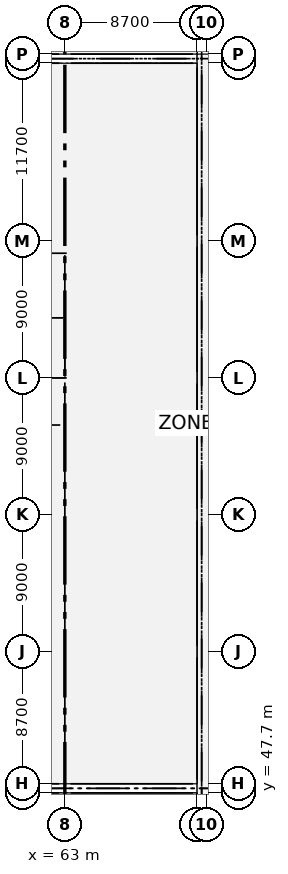
"""IFC4 building model, lengths in metres.
Left out: names, types, materials, properties, quantities, classifications, styles, units other than length and angle.
Written with IfcOpenShell. Run it as: python <this file> out.ifc"""

import sys

from ifc_helpers import new_model, si_unit, direction, frame, frame_2d, origin, origin_2d, place, context, subcontext, project, spatial, rectangle, extrude, element, fill, save


model = new_model("IFC4")
c1 = context("Model", 3, precision=1e-05, world=origin(), true_north=direction((0.0, 1.0)))
c2 = subcontext(c1, "Body", "Model", "MODEL_VIEW")
j1 = project(units=[si_unit("LENGTHUNIT", "METRE"), si_unit("PLANEANGLEUNIT", "RADIAN")], contexts=[c1])
p1 = place(None, origin())
s1 = spatial("IfcSite", under=j1, at=p1, CompositionType="ELEMENT")
p2 = place(p1, origin())
s2 = spatial("IfcBuilding", under=s1, at=p2, CompositionType="ELEMENT")
p3 = place(p2, origin())
s3 = spatial("IfcBuildingStorey", under=s2, at=p3, CompositionType="ELEMENT", Elevation=0.0)
for number, where, z_axis, x_axis in (
    (1, (63.0, 47.7, -0.5), (0.0, 0.0, 1.0), (1.0, 0.0, 0.0)),
    (2, (63.0, 48.3, -0.5), (0.0, 0.0, 1.0), (1.0, 0.0, 0.0)),
):
    element("IfcColumn", number, at=place(p3, frame(where, z_axis=z_axis, x_axis=x_axis)), inside=s3, PredefinedType="COLUMN", context=c2, shape_type="SweptSolid", body=[
        extrude(rectangle(XDim=0.75, YDim=0.55, at=origin_2d()), origin(), (0.0, 0.0, 1.0), 6.8),
    ])
for number, where, z_axis, x_axis in (
    (3, (63.0, 57.0, -0.5), (0.0, 0.0, 1.0), (1.0, 0.0, 0.0)),
    (4, (63.0, 66.0, -0.5), (0.0, 0.0, 1.0), (1.0, 0.0, 0.0)),
    (5, (63.0, 75.0, -0.5), (0.0, 0.0, 1.0), (1.0, 0.0, 0.0)),
    (6, (63.0, 84.0, -0.5), (0.0, 0.0, 1.0), (1.0, 0.0, 0.0)),
):
    element("IfcColumn", number, at=place(p3, frame(where, z_axis=z_axis, x_axis=x_axis)), inside=s3, PredefinedType="COLUMN", context=c2, shape_type="SweptSolid", body=[
        extrude(rectangle(XDim=0.75, YDim=0.75, at=origin_2d()), origin(), (0.0, 0.0, 1.0), 6.8),
    ])
for number, where, z_axis, x_axis in (
    (7, (63.0, 95.7, -0.5), (0.0, 0.0, 1.0), (1.0, 0.0, 0.0)),
    (8, (63.0, 96.3, -0.5), (0.0, 0.0, 1.0), (1.0, 0.0, 0.0)),
):
    element("IfcColumn", number, at=place(p3, frame(where, z_axis=z_axis, x_axis=x_axis)), inside=s3, PredefinedType="COLUMN", context=c2, shape_type="SweptSolid", body=[
        extrude(rectangle(XDim=0.75, YDim=0.55, at=origin_2d()), origin(), (0.0, 0.0, 1.0), 6.8),
    ])
for number, where, z_axis, x_axis in (
    (9, (71.7, 47.7, -0.5), (0.0, 0.0, 1.0), (1.0, 0.0, 0.0)),
    (10, (71.7, 48.3, -0.5), (0.0, 0.0, 1.0), (1.0, 0.0, 0.0)),
):
    element("IfcColumn", number, at=place(p3, frame(where, z_axis=z_axis, x_axis=x_axis)), inside=s3, PredefinedType="COLUMN", context=c2, shape_type="SweptSolid", body=[
        extrude(rectangle(XDim=0.55, YDim=0.55, at=origin_2d()), origin(), (0.0, 0.0, 1.0), 6.8),
    ])
for number, where, z_axis, x_axis in (
    (11, (71.7, 57.0, -0.5), (0.0, 0.0, 1.0), (1.0, 0.0, 0.0)),
    (12, (71.7, 66.0, -0.5), (0.0, 0.0, 1.0), (1.0, 0.0, 0.0)),
    (13, (71.7, 75.0, -0.5), (0.0, 0.0, 1.0), (1.0, 0.0, 0.0)),
    (14, (71.7, 84.0, -0.5), (0.0, 0.0, 1.0), (1.0, 0.0, 0.0)),
):
    element("IfcColumn", number, at=place(p3, frame(where, z_axis=z_axis, x_axis=x_axis)), inside=s3, PredefinedType="COLUMN", context=c2, shape_type="SweptSolid", body=[
        extrude(rectangle(XDim=0.55, YDim=0.75, at=origin_2d()), origin(), (0.0, 0.0, 1.0), 6.8),
    ])
for number, where, z_axis, x_axis in (
    (15, (71.7, 95.7, -0.5), (0.0, 0.0, 1.0), (1.0, 0.0, 0.0)),
    (16, (71.7, 96.3, -0.5), (0.0, 0.0, 1.0), (1.0, 0.0, 0.0)),
    (17, (72.3, 96.3, -0.5), (0.0, 0.0, 1.0), (1.0, 0.0, 0.0)),
):
    element("IfcColumn", number, at=place(p3, frame(where, z_axis=z_axis, x_axis=x_axis)), inside=s3, PredefinedType="COLUMN", context=c2, shape_type="SweptSolid", body=[
        extrude(rectangle(XDim=0.55, YDim=0.55, at=origin_2d()), origin(), (0.0, 0.0, 1.0), 6.8),
    ])
p4 = place(p3, frame((54.375, 47.7, 0.0), z_axis=(0.0, 0.0, 1.0), x_axis=(1.0, 0.0, 0.0)))
e18 = element("IfcWall", 18, at=p4, inside=s3, PredefinedType="SOLIDWALL", context=c2, shape_type="SweptSolid", body=[
    extrude(rectangle(XDim=8.25, YDim=0.38, at=frame_2d((4.125, 0.0))), origin(), (0.0, 0.0, 1.0), 5.08),
])
p5 = place(p3, frame((63.375, 47.7, 0.0), z_axis=(0.0, 0.0, 1.0), x_axis=(1.0, 0.0, 0.0)))
e19 = element("IfcWall", 19, at=p5, inside=s3, PredefinedType="SOLIDWALL", context=c2, shape_type="SweptSolid", body=[
    extrude(rectangle(XDim=8.05, YDim=0.38, at=frame_2d((4.025, 0.0))), origin(), (0.0, 0.0, 1.0), 5.08),
])
p6 = place(p3, frame((54.375, 48.3, 0.0), z_axis=(0.0, 0.0, 1.0), x_axis=(1.0, 0.0, 0.0)))
e20 = element("IfcWall", 20, at=p6, inside=s3, PredefinedType="SOLIDWALL", context=c2, shape_type="SweptSolid", body=[
    extrude(rectangle(XDim=8.25, YDim=0.38, at=frame_2d((4.125, 0.0))), origin(), (0.0, 0.0, 1.0), 5.08),
])
p7 = place(p6, frame((3.325, 0.0, 3.59)))
e21 = element("IfcOpeningElement", 21, at=p7, cuts=e20, PredefinedType="OPENING", context=c2, shape_type="SweptSolid", body=[
    extrude(rectangle(XDim=1.6, YDim=1.45, at=frame_2d((0.8, 0.725))), frame((0.0, 0.2, 0.0), z_axis=(0.0, -1.0, 0.0), x_axis=(1.0, 0.0, 0.0)), (0.0, 0.0, 1.0), 0.4),
])
p8 = place(p3, frame((63.375, 48.3, 0.0), z_axis=(0.0, 0.0, 1.0), x_axis=(1.0, 0.0, 0.0)))
e22 = element("IfcWall", 22, at=p8, inside=s3, PredefinedType="SOLIDWALL", context=c2, shape_type="SweptSolid", body=[
    extrude(rectangle(XDim=8.05, YDim=0.38, at=frame_2d((4.025, 0.0))), origin(), (0.0, 0.0, 1.0), 5.08),
])
p9 = place(p3, frame((54.375, 95.7, 0.0), z_axis=(0.0, 0.0, 1.0), x_axis=(1.0, 0.0, 0.0)))
e23 = element("IfcWall", 23, at=p9, inside=s3, PredefinedType="SOLIDWALL", context=c2, shape_type="SweptSolid", body=[
    extrude(rectangle(XDim=8.25, YDim=0.38, at=frame_2d((4.125, 0.0))), origin(), (0.0, 0.0, 1.0), 5.08),
])
p10 = place(p3, frame((63.375, 95.7, 0.0), z_axis=(0.0, 0.0, 1.0), x_axis=(1.0, 0.0, 0.0)))
e24 = element("IfcWall", 24, at=p10, inside=s3, PredefinedType="SOLIDWALL", context=c2, shape_type="SweptSolid", body=[
    extrude(rectangle(XDim=8.05, YDim=0.38, at=frame_2d((4.025, 0.0))), origin(), (0.0, 0.0, 1.0), 5.08),
])
p11 = place(p3, frame((71.7, 48.575, 0.0), z_axis=(0.0, 0.0, 1.0), x_axis=(0.0, 1.0, 0.0)))
e25 = element("IfcWall", 25, at=p11, inside=s3, PredefinedType="SOLIDWALL", context=c2, shape_type="SweptSolid", body=[
    extrude(rectangle(XDim=8.05, YDim=0.38, at=frame_2d((4.025, 0.0))), origin(), (0.0, 0.0, 1.0), 5.08),
])
p12 = place(p11, frame((3.225, 0.0, 3.59)))
e26 = element("IfcOpeningElement", 26, at=p12, cuts=e25, PredefinedType="OPENING", context=c2, shape_type="SweptSolid", body=[
    extrude(rectangle(XDim=1.6, YDim=1.45, at=frame_2d((0.8, 0.725))), frame((0.0, 0.2, 0.0), z_axis=(0.0, -1.0, 0.0), x_axis=(1.0, 0.0, 0.0)), (0.0, 0.0, 1.0), 0.4),
])
p13 = place(p3, frame((71.7, 57.375, 0.0), z_axis=(0.0, 0.0, 1.0), x_axis=(0.0, 1.0, 0.0)))
e27 = element("IfcWall", 27, at=p13, inside=s3, PredefinedType="SOLIDWALL", context=c2, shape_type="SweptSolid", body=[
    extrude(rectangle(XDim=8.25, YDim=0.38, at=frame_2d((4.125, 0.0))), origin(), (0.0, 0.0, 1.0), 5.08),
])
p14 = place(p3, frame((71.7, 66.375, 0.0), z_axis=(0.0, 0.0, 1.0), x_axis=(0.0, 1.0, 0.0)))
e28 = element("IfcWall", 28, at=p14, inside=s3, PredefinedType="SOLIDWALL", context=c2, shape_type="SweptSolid", body=[
    extrude(rectangle(XDim=8.25, YDim=0.38, at=frame_2d((4.125, 0.0))), origin(), (0.0, 0.0, 1.0), 5.08),
])
p15 = place(p14, frame((3.325, 0.0, 3.59)))
e29 = element("IfcOpeningElement", 29, at=p15, cuts=e28, PredefinedType="OPENING", context=c2, shape_type="SweptSolid", body=[
    extrude(rectangle(XDim=1.6, YDim=1.45, at=frame_2d((0.8, 0.725))), frame((0.0, 0.2, 0.0), z_axis=(0.0, -1.0, 0.0), x_axis=(1.0, 0.0, 0.0)), (0.0, 0.0, 1.0), 0.4),
])
p16 = place(p3, frame((71.7, 75.375, 0.0), z_axis=(0.0, 0.0, 1.0), x_axis=(0.0, 1.0, 0.0)))
e30 = element("IfcWall", 30, at=p16, inside=s3, PredefinedType="SOLIDWALL", context=c2, shape_type="SweptSolid", body=[
    extrude(rectangle(XDim=8.25, YDim=0.38, at=frame_2d((4.125, 0.0))), origin(), (0.0, 0.0, 1.0), 5.08),
])
p17 = place(p3, frame((71.7, 84.375, 0.0), z_axis=(0.0, 0.0, 1.0), x_axis=(0.0, 1.0, 0.0)))
e31 = element("IfcWall", 31, at=p17, inside=s3, PredefinedType="SOLIDWALL", context=c2, shape_type="SweptSolid", body=[
    extrude(rectangle(XDim=11.05, YDim=0.38, at=frame_2d((5.525, 0.0))), origin(), (0.0, 0.0, 1.0), 4.83),
])
p18 = place(p17, frame((4.725, 0.0, 3.34)))
e32 = element("IfcOpeningElement", 32, at=p18, cuts=e31, PredefinedType="OPENING", context=c2, shape_type="SweptSolid", body=[
    extrude(rectangle(XDim=1.6, YDim=1.45, at=frame_2d((0.8, 0.725))), frame((0.0, 0.2, 0.0), z_axis=(0.0, -1.0, 0.0), x_axis=(1.0, 0.0, 0.0)), (0.0, 0.0, 1.0), 0.4),
])
p19 = place(p3, frame((54.375, 96.3, 0.0), z_axis=(0.0, 0.0, 1.0), x_axis=(1.0, 0.0, 0.0)))
e33 = element("IfcWall", 33, at=p19, inside=s3, PredefinedType="SOLIDWALL", context=c2, shape_type="SweptSolid", body=[
    extrude(rectangle(XDim=8.25, YDim=0.38, at=frame_2d((4.125, 0.0))), origin(), (0.0, 0.0, 1.0), 5.08),
])
p20 = place(p19, frame((3.325, 0.0, 3.59)))
e34 = element("IfcOpeningElement", 34, at=p20, cuts=e33, PredefinedType="OPENING", context=c2, shape_type="SweptSolid", body=[
    extrude(rectangle(XDim=1.6, YDim=1.45, at=frame_2d((0.8, 0.725))), frame((0.0, 0.2, 0.0), z_axis=(0.0, -1.0, 0.0), x_axis=(1.0, 0.0, 0.0)), (0.0, 0.0, 1.0), 0.4),
])
p21 = place(p3, frame((63.375, 96.3, 0.0), z_axis=(0.0, 0.0, 1.0), x_axis=(1.0, 0.0, 0.0)))
e35 = element("IfcWall", 35, at=p21, inside=s3, PredefinedType="SOLIDWALL", context=c2, shape_type="SweptSolid", body=[
    extrude(rectangle(XDim=8.05, YDim=0.38, at=frame_2d((4.025, 0.0))), origin(), (0.0, 0.0, 1.0), 5.08),
])
p22 = place(p3, frame((53.875, 75.0, -0.5), z_axis=(0.0, 0.0, 1.0), x_axis=(1.0, 0.0, 0.0)))
e36 = element("IfcWall", 36, at=p22, inside=s3, PredefinedType="SOLIDWALL", context=c2, shape_type="SweptSolid", body=[
    extrude(rectangle(XDim=9.25, YDim=0.25, at=frame_2d((4.625, 0.0))), origin(), (0.0, 0.0, 1.0), 6.8),
])
p23 = place(p3, frame((53.875, 83.2, -0.5), z_axis=(0.0, 0.0, 1.0), x_axis=(1.0, 0.0, 0.0)))
e37 = element("IfcWall", 37, at=p23, inside=s3, PredefinedType="SOLIDWALL", context=c2, shape_type="SweptSolid", body=[
    extrude(rectangle(XDim=9.25, YDim=0.25, at=frame_2d((4.625, 0.0))), origin(), (0.0, 0.0, 1.0), 6.8),
])
p24 = place(p23, frame((5.775, 0.0, 0.5)))
e38 = element("IfcOpeningElement", 38, at=p24, cuts=e37, PredefinedType="OPENING", context=c2, shape_type="SweptSolid", body=[
    extrude(rectangle(XDim=1.6, YDim=2.2, at=frame_2d((0.8, 1.1))), frame((0.0, 0.135, 0.0), z_axis=(0.0, -1.0, 0.0), x_axis=(1.0, 0.0, 0.0)), (0.0, 0.0, 1.0), 0.27),
])
p25 = place(p3, frame((63.0, 75.125, -0.5), z_axis=(0.0, 0.0, 1.0), x_axis=(0.0, 1.0, 0.0)))
e39 = element("IfcWall", 39, at=p25, inside=s3, PredefinedType="SOLIDWALL", context=c2, shape_type="SweptSolid", body=[
    extrude(rectangle(XDim=7.95, YDim=0.25, at=frame_2d((3.975, 0.0))), origin(), (0.0, 0.0, 1.0), 6.8),
])
p26 = place(p3, frame((54.125, 78.95, -0.5), z_axis=(0.0, 0.0, 1.0), x_axis=(1.0, 0.0, 0.0)))
e40 = element("IfcWall", 40, at=p26, inside=s3, PredefinedType="SOLIDWALL", context=c2, shape_type="SweptSolid", body=[
    extrude(rectangle(XDim=8.75, YDim=0.25, at=frame_2d((4.375, 0.0))), origin(), (0.0, 0.0, 1.0), 6.8),
])
p27 = place(p3, frame((57.6, 71.9, 0.0), z_axis=(0.0, 0.0, 1.0), x_axis=(1.0, 0.0, 0.0)))
e41 = element("IfcWall", 41, at=p27, inside=s3, PredefinedType="PARTITIONING", context=c2, shape_type="SweptSolid", body=[
    extrude(rectangle(XDim=5.1, YDim=0.125, at=frame_2d((2.55, 0.0))), origin(), (0.0, 0.0, 1.0), 5.95),
])
p28 = place(p27, frame((2.04, 0.0, 0.0)))
e42 = element("IfcOpeningElement", 42, at=p28, cuts=e41, PredefinedType="OPENING", context=c2, shape_type="SweptSolid", body=[
    extrude(rectangle(XDim=1.02, YDim=2.18, at=frame_2d((0.51, 1.09))), frame((0.0, 0.073, 0.0), z_axis=(0.0, -1.0, 0.0), x_axis=(1.0, 0.0, 0.0)), (0.0, 0.0, 1.0), 0.145),
])
p29 = place(p3, frame((63.0, 48.75, 0.0), z_axis=(0.0, 0.0, 1.0), x_axis=(0.0, 1.0, 0.0)))
e43 = element("IfcWall", 43, at=p29, inside=s3, PredefinedType="STANDARD", context=c2, shape_type="SweptSolid", body=[
    extrude(rectangle(XDim=22.85, YDim=0.21, at=frame_2d((11.425, 0.0))), origin(), (0.0, 0.0, 1.0), 5.18),
])
p30 = place(p3, frame((63.0, 72.2, 0.0), z_axis=(0.0, 0.0, 1.0), x_axis=(0.0, 1.0, 0.0)))
e44 = element("IfcWall", 44, at=p30, inside=s3, PredefinedType="STANDARD", context=c2, shape_type="SweptSolid", body=[
    extrude(rectangle(XDim=2.5, YDim=0.195, at=frame_2d((1.25, 0.0))), origin(), (0.0, 0.0, 1.0), 5.18),
])
p31 = place(p30, frame((0.175, 0.0, 0.0)))
e45 = element("IfcOpeningElement", 45, at=p31, cuts=e44, PredefinedType="OPENING", context=c2, shape_type="SweptSolid", body=[
    extrude(rectangle(XDim=2.15, YDim=2.55, at=frame_2d((1.075, 1.275))), frame((0.0, 0.107, 0.0), z_axis=(0.0, -1.0, 0.0), x_axis=(1.0, 0.0, 0.0)), (0.0, 0.0, 1.0), 0.215),
])
p32 = place(p12, origin())
e46 = element("IfcWindow", 46, at=p32, inside=s3, PartitioningType="DOUBLE_PANEL_HORIZONTAL", PredefinedType="WINDOW", context=c2, shape_type="SweptSolid", body=[
    extrude(rectangle(XDim=1.6, YDim=1.45, at=frame_2d((0.8, 0.725))), frame((0.0, 0.03, 0.0), z_axis=(0.0, -1.0, 0.0), x_axis=(1.0, 0.0, 0.0)), (0.0, 0.0, 1.0), 0.06),
])
fill(e26, e46)
p33 = place(p15, origin())
e47 = element("IfcWindow", 47, at=p33, inside=s3, PartitioningType="DOUBLE_PANEL_HORIZONTAL", PredefinedType="WINDOW", context=c2, shape_type="SweptSolid", body=[
    extrude(rectangle(XDim=1.6, YDim=1.45, at=frame_2d((0.8, 0.725))), frame((0.0, 0.03, 0.0), z_axis=(0.0, -1.0, 0.0), x_axis=(1.0, 0.0, 0.0)), (0.0, 0.0, 1.0), 0.06),
])
fill(e29, e47)
p34 = place(p18, origin())
e48 = element("IfcWindow", 48, at=p34, inside=s3, PartitioningType="DOUBLE_PANEL_HORIZONTAL", PredefinedType="WINDOW", context=c2, shape_type="SweptSolid", body=[
    extrude(rectangle(XDim=1.6, YDim=1.45, at=frame_2d((0.8, 0.725))), frame((0.0, 0.03, 0.0), z_axis=(0.0, -1.0, 0.0), x_axis=(1.0, 0.0, 0.0)), (0.0, 0.0, 1.0), 0.06),
])
fill(e32, e48)
p35 = place(p31, origin())
e49 = element("IfcDoor", 49, at=p35, inside=s3, OperationType="SLIDING_TO_LEFT", PredefinedType="DOOR", context=c2, shape_type="SweptSolid", body=[
    extrude(rectangle(XDim=2.15, YDim=2.55, at=frame_2d((1.075, 1.275))), frame((0.0, 0.025, 0.0), z_axis=(0.0, -1.0, 0.0), x_axis=(1.0, 0.0, 0.0)), (0.0, 0.0, 1.0), 0.05),
])
fill(e45, e49)
save(model, sys.argv[1])
